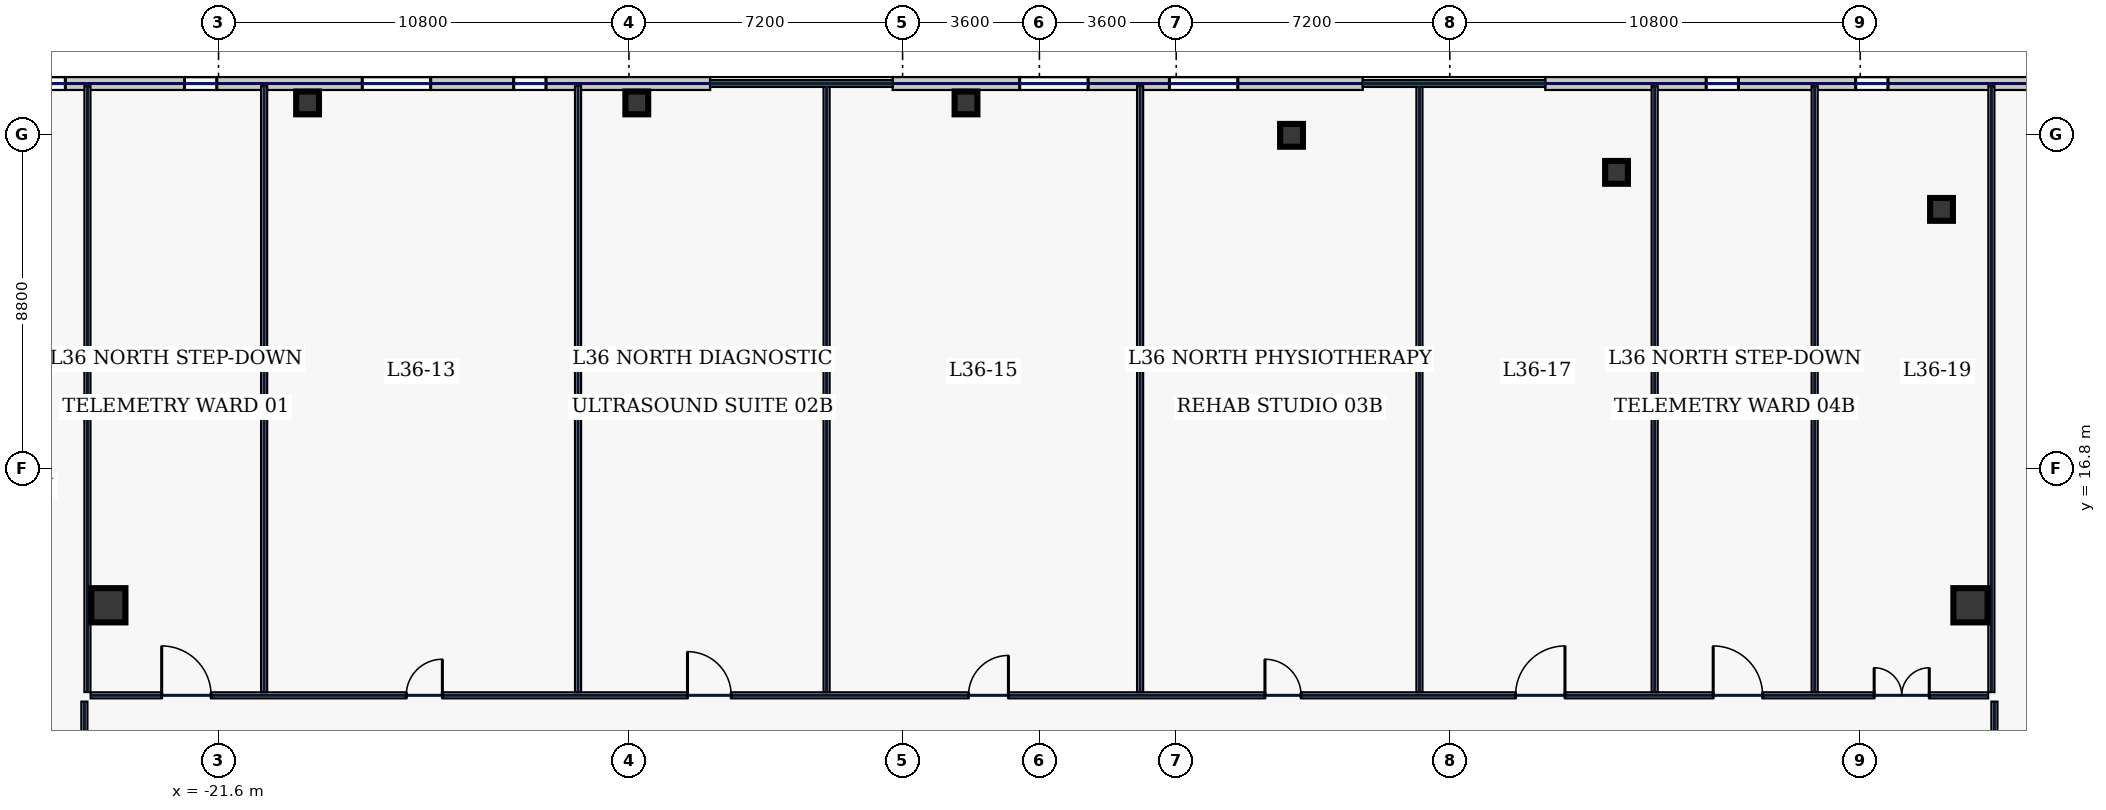
"""IFC4 building model, lengths in metres.
Left out: names, types, materials, properties, quantities, classifications, styles, units other than length and angle.
Written with IfcOpenShell. Run it as: python <this file> out.ifc"""

import sys

from ifc_helpers import new_model, si_unit, direction, frame, frame_2d, origin, origin_2d, place, context, subcontext, project, spatial, rectangle, hollow_rectangle, extrude, element, fill, save


model = new_model("IFC4")
c1 = context("Model", 3, precision=1e-05, world=origin(), true_north=direction((0.0, 1.0)))
c2 = subcontext(c1, "Body", "Model", "MODEL_VIEW")
j1 = project(units=[si_unit("LENGTHUNIT", "METRE"), si_unit("PLANEANGLEUNIT", "RADIAN")], contexts=[c1])
p1 = place(None, origin())
s1 = spatial("IfcSite", under=j1, at=p1, CompositionType="ELEMENT")
p2 = place(p1, origin())
s2 = spatial("IfcBuilding", under=s1, at=p2, CompositionType="ELEMENT")
p3 = place(p2, frame((0.0, 0.0, 160.2)))
s3 = spatial("IfcBuildingStorey", under=s2, at=p3, CompositionType="ELEMENT", Elevation=160.2)
for number, where, z_axis, x_axis in (
    (1, (-24.5, 13.2, 0.0), (0.0, 0.0, 1.0), (1.0, 0.0, 0.0)),
    (2, (24.5, 13.2, 0.0), (0.0, 0.0, 1.0), (1.0, 0.0, 0.0)),
):
    element("IfcColumn", number, at=place(p3, frame(where, z_axis=z_axis, x_axis=x_axis)), inside=s3, PredefinedType="COLUMN", context=c2, shape_type="SweptSolid", body=[
        extrude(hollow_rectangle(XDim=0.9, YDim=0.9, WallThickness=0.04, at=origin_2d()), origin(), (0.0, 0.0, 1.0), 3.74),
    ])
for number, where, z_axis, x_axis in (
    (3, (23.738, 23.618, 0.0), (0.0, 0.0, 1.0), (1.0, 0.0, 0.0)),
    (4, (15.186, 24.592, 0.0), (0.0, 0.0, 1.0), (1.0, 0.0, 0.0)),
    (5, (6.634, 25.567, 0.0), (0.0, 0.0, 1.0), (1.0, 0.0, 0.0)),
    (6, (-1.931, 26.42, 0.0), (0.0, 0.0, 1.0), (1.0, 0.0, 0.0)),
    (7, (-10.594, 26.42, 0.0), (0.0, 0.0, 1.0), (1.0, 0.0, 0.0)),
    (8, (-19.257, 26.42, 0.0), (0.0, 0.0, 1.0), (1.0, 0.0, 0.0)),
):
    element("IfcColumn", number, at=place(p3, frame(where, z_axis=z_axis, x_axis=x_axis)), inside=s3, PredefinedType="COLUMN", context=c2, shape_type="SweptSolid", body=[
        extrude(hollow_rectangle(XDim=0.6, YDim=0.6, WallThickness=0.028, at=origin_2d()), origin(), (0.0, 0.0, 1.0), 3.74),
    ])
p4 = place(p3, frame((33.4, 26.93, 0.0), z_axis=(0.0, 0.0, 1.0), x_axis=(-1.0, 0.0, 0.0)))
e9 = element("IfcWall", 9, at=p4, inside=s3, PredefinedType="STANDARD", context=c2, shape_type="SweptSolid", body=[
    extrude(rectangle(XDim=20.09, YDim=0.34, at=frame_2d((10.045, 0.0))), origin(), (0.0, 0.0, 1.0), 3.74),
])
p5 = place(p4, frame((15.005, 0.0, 0.7)))
e10 = element("IfcOpeningElement", 10, at=p5, cuts=e9, PredefinedType="OPENING", context=c2, shape_type="SweptSolid", body=[
    extrude(rectangle(XDim=0.85, YDim=1.85, at=frame_2d((0.425, 0.925))), frame((0.0, 0.18, 0.0), z_axis=(0.0, -1.0, 0.0), x_axis=(1.0, 0.0, 0.0)), (0.0, 0.0, 1.0), 0.36),
])
p6 = place(p4, frame((11.071, 0.0, 0.7)))
e11 = element("IfcOpeningElement", 11, at=p6, cuts=e9, PredefinedType="OPENING", context=c2, shape_type="SweptSolid", body=[
    extrude(rectangle(XDim=0.85, YDim=1.85, at=frame_2d((0.425, 0.925))), frame((0.0, 0.18, 0.0), z_axis=(0.0, -1.0, 0.0), x_axis=(1.0, 0.0, 0.0)), (0.0, 0.0, 1.0), 0.36),
])
p7 = place(p4, frame((6.48, 0.0, 0.7)))
e12 = element("IfcOpeningElement", 12, at=p7, cuts=e9, PredefinedType="OPENING", context=c2, shape_type="SweptSolid", body=[
    extrude(rectangle(XDim=0.85, YDim=1.85, at=frame_2d((0.425, 0.925))), frame((0.0, 0.18, 0.0), z_axis=(0.0, -1.0, 0.0), x_axis=(1.0, 0.0, 0.0)), (0.0, 0.0, 1.0), 0.36),
])
p8 = place(p4, frame((2.591, 0.0, 0.7)))
e13 = element("IfcOpeningElement", 13, at=p8, cuts=e9, PredefinedType="OPENING", context=c2, shape_type="SweptSolid", body=[
    extrude(rectangle(XDim=1.8, YDim=2.2, at=frame_2d((0.9, 1.1))), frame((0.0, 0.18, 0.0), z_axis=(0.0, -1.0, 0.0), x_axis=(1.0, 0.0, 0.0)), (0.0, 0.0, 1.0), 0.36),
])
p9 = place(p3, frame((8.51, 26.93, 0.0), z_axis=(0.0, 0.0, 1.0), x_axis=(-1.0, 0.0, 0.0)))
e14 = element("IfcWall", 14, at=p9, inside=s3, PredefinedType="STANDARD", context=c2, shape_type="SweptSolid", body=[
    extrude(rectangle(XDim=12.373, YDim=0.34, at=frame_2d((6.187, 0.0))), origin(), (0.0, 0.0, 1.0), 3.74),
])
p10 = place(p9, frame((7.229, 0.0, 0.7)))
e15 = element("IfcOpeningElement", 15, at=p10, cuts=e14, PredefinedType="OPENING", context=c2, shape_type="SweptSolid", body=[
    extrude(rectangle(XDim=1.8, YDim=2.2, at=frame_2d((0.9, 1.1))), frame((0.0, 0.18, 0.0), z_axis=(0.0, -1.0, 0.0), x_axis=(1.0, 0.0, 0.0)), (0.0, 0.0, 1.0), 0.36),
])
p11 = place(p9, frame((3.289, 0.0, 0.7)))
e16 = element("IfcOpeningElement", 16, at=p11, cuts=e14, PredefinedType="OPENING", context=c2, shape_type="SweptSolid", body=[
    extrude(rectangle(XDim=1.8, YDim=2.2, at=frame_2d((0.9, 1.1))), frame((0.0, 0.18, 0.0), z_axis=(0.0, -1.0, 0.0), x_axis=(1.0, 0.0, 0.0)), (0.0, 0.0, 1.0), 0.36),
])
p12 = place(p3, frame((-8.663, 26.93, 0.0), z_axis=(0.0, 0.0, 1.0), x_axis=(-1.0, 0.0, 0.0)))
e17 = element("IfcWall", 17, at=p12, inside=s3, PredefinedType="STANDARD", context=c2, shape_type="SweptSolid", body=[
    extrude(rectangle(XDim=19.937, YDim=0.34, at=frame_2d((9.969, 0.0))), origin(), (0.0, 0.0, 1.0), 3.74),
])
p13 = place(p12, frame((16.968, 0.0, 0.7)))
e18 = element("IfcOpeningElement", 18, at=p13, cuts=e17, PredefinedType="OPENING", context=c2, shape_type="SweptSolid", body=[
    extrude(rectangle(XDim=0.85, YDim=1.85, at=frame_2d((0.425, 0.925))), frame((0.0, 0.18, 0.0), z_axis=(0.0, -1.0, 0.0), x_axis=(1.0, 0.0, 0.0)), (0.0, 0.0, 1.0), 0.36),
])
p14 = place(p12, frame((12.983, 0.0, 0.7)))
e19 = element("IfcOpeningElement", 19, at=p14, cuts=e17, PredefinedType="OPENING", context=c2, shape_type="SweptSolid", body=[
    extrude(rectangle(XDim=0.85, YDim=1.85, at=frame_2d((0.425, 0.925))), frame((0.0, 0.18, 0.0), z_axis=(0.0, -1.0, 0.0), x_axis=(1.0, 0.0, 0.0)), (0.0, 0.0, 1.0), 0.36),
])
p15 = place(p12, frame((7.355, 0.0, 0.7)))
e20 = element("IfcOpeningElement", 20, at=p15, cuts=e17, PredefinedType="OPENING", context=c2, shape_type="SweptSolid", body=[
    extrude(rectangle(XDim=1.8, YDim=2.2, at=frame_2d((0.9, 1.1))), frame((0.0, 0.18, 0.0), z_axis=(0.0, -1.0, 0.0), x_axis=(1.0, 0.0, 0.0)), (0.0, 0.0, 1.0), 0.36),
])
p16 = place(p12, frame((4.321, 0.0, 0.7)))
e21 = element("IfcOpeningElement", 21, at=p16, cuts=e17, PredefinedType="OPENING", context=c2, shape_type="SweptSolid", body=[
    extrude(rectangle(XDim=0.85, YDim=1.85, at=frame_2d((0.425, 0.925))), frame((0.0, 0.18, 0.0), z_axis=(0.0, -1.0, 0.0), x_axis=(1.0, 0.0, 0.0)), (0.0, 0.0, 1.0), 0.36),
])
p17 = place(p3, frame((-25.13, 7.685, 0.0), z_axis=(0.0, 0.0, 1.0), x_axis=(0.0, 1.0, 0.0)))
e22 = element("IfcWall", 22, at=p17, inside=s3, PredefinedType="PARTITIONING", context=c2, shape_type="SweptSolid", body=[
    extrude(rectangle(XDim=2.98, YDim=0.16, at=frame_2d((1.49, 0.0))), origin(), (0.0, 0.0, 1.0), 3.74),
])
p18 = place(p17, frame((1.1, 0.0, 0.0)))
e23 = element("IfcOpeningElement", 23, at=p18, cuts=e22, PredefinedType="OPENING", context=c2, shape_type="SweptSolid", body=[
    extrude(rectangle(XDim=0.95, YDim=2.2, at=frame_2d((0.475, 1.1))), frame((0.0, 0.09, 0.0), z_axis=(0.0, -1.0, 0.0), x_axis=(1.0, 0.0, 0.0)), (0.0, 0.0, 1.0), 0.18),
])
p19 = place(p3, frame((-24.965, 10.83, 0.0), z_axis=(0.0, 0.0, 1.0), x_axis=(1.0, 0.0, 0.0)))
e24 = element("IfcWall", 24, at=p19, inside=s3, PredefinedType="PARTITIONING", context=c2, shape_type="SweptSolid", body=[
    extrude(rectangle(XDim=49.93, YDim=0.16, at=frame_2d((24.965, 0.0))), origin(), (0.0, 0.0, 1.0), 3.74),
])
p20 = place(p19, frame((1.869, 0.0, 0.0)))
e25 = element("IfcOpeningElement", 25, at=p20, cuts=e24, PredefinedType="OPENING", context=c2, shape_type="SweptSolid", body=[
    extrude(rectangle(XDim=1.3, YDim=2.2, at=frame_2d((0.65, 1.1))), frame((0.0, 0.09, 0.0), z_axis=(0.0, -1.0, 0.0), x_axis=(1.0, 0.0, 0.0)), (0.0, 0.0, 1.0), 0.18),
])
p21 = place(p19, frame((8.305, 0.0, 0.0)))
e26 = element("IfcOpeningElement", 26, at=p21, cuts=e24, PredefinedType="OPENING", context=c2, shape_type="SweptSolid", body=[
    extrude(rectangle(XDim=0.95, YDim=2.2, at=frame_2d((0.475, 1.1))), frame((0.0, 0.09, 0.0), z_axis=(0.0, -1.0, 0.0), x_axis=(1.0, 0.0, 0.0)), (0.0, 0.0, 1.0), 0.18),
])
p22 = place(p19, frame((15.705, 0.0, 0.0)))
e27 = element("IfcOpeningElement", 27, at=p22, cuts=e24, PredefinedType="OPENING", context=c2, shape_type="SweptSolid", body=[
    extrude(rectangle(XDim=1.15, YDim=2.2, at=frame_2d((0.575, 1.1))), frame((0.0, 0.09, 0.0), z_axis=(0.0, -1.0, 0.0), x_axis=(1.0, 0.0, 0.0)), (0.0, 0.0, 1.0), 0.18),
])
p23 = place(p19, frame((23.1, 0.0, 0.0)))
e28 = element("IfcOpeningElement", 28, at=p23, cuts=e24, PredefinedType="OPENING", context=c2, shape_type="SweptSolid", body=[
    extrude(rectangle(XDim=1.05, YDim=2.2, at=frame_2d((0.525, 1.1))), frame((0.0, 0.09, 0.0), z_axis=(0.0, -1.0, 0.0), x_axis=(1.0, 0.0, 0.0)), (0.0, 0.0, 1.0), 0.18),
])
p24 = place(p19, frame((30.9, 0.0, 0.0)))
e29 = element("IfcOpeningElement", 29, at=p24, cuts=e24, PredefinedType="OPENING", context=c2, shape_type="SweptSolid", body=[
    extrude(rectangle(XDim=0.95, YDim=2.2, at=frame_2d((0.475, 1.1))), frame((0.0, 0.09, 0.0), z_axis=(0.0, -1.0, 0.0), x_axis=(1.0, 0.0, 0.0)), (0.0, 0.0, 1.0), 0.18),
])
p25 = place(p19, frame((37.495, 0.0, 0.0)))
e30 = element("IfcOpeningElement", 30, at=p25, cuts=e24, PredefinedType="OPENING", context=c2, shape_type="SweptSolid", body=[
    extrude(rectangle(XDim=1.3, YDim=2.2, at=frame_2d((0.65, 1.1))), frame((0.0, 0.09, 0.0), z_axis=(0.0, -1.0, 0.0), x_axis=(1.0, 0.0, 0.0)), (0.0, 0.0, 1.0), 0.18),
])
p26 = place(p19, frame((42.695, 0.0, 0.0)))
e31 = element("IfcOpeningElement", 31, at=p26, cuts=e24, PredefinedType="OPENING", context=c2, shape_type="SweptSolid", body=[
    extrude(rectangle(XDim=1.3, YDim=2.2, at=frame_2d((0.65, 1.1))), frame((0.0, 0.09, 0.0), z_axis=(0.0, -1.0, 0.0), x_axis=(1.0, 0.0, 0.0)), (0.0, 0.0, 1.0), 0.18),
])
p27 = place(p19, frame((46.931, 0.0, 0.0)))
e32 = element("IfcOpeningElement", 32, at=p27, cuts=e24, PredefinedType="OPENING", context=c2, shape_type="SweptSolid", body=[
    extrude(rectangle(XDim=1.45, YDim=2.2, at=frame_2d((0.725, 1.1))), frame((0.0, 0.09, 0.0), z_axis=(0.0, -1.0, 0.0), x_axis=(1.0, 0.0, 0.0)), (0.0, 0.0, 1.0), 0.18),
])
p28 = place(p3, frame((25.13, 10.665, 0.0), z_axis=(0.0, 0.0, 1.0), x_axis=(0.0, -1.0, 0.0)))
e33 = element("IfcWall", 33, at=p28, inside=s3, PredefinedType="PARTITIONING", context=c2, shape_type="SweptSolid", body=[
    extrude(rectangle(XDim=2.98, YDim=0.16, at=frame_2d((1.49, 0.0))), origin(), (0.0, 0.0, 1.0), 3.74),
])
p29 = place(p28, frame((1.1, 0.0, 0.0)))
e34 = element("IfcOpeningElement", 34, at=p29, cuts=e33, PredefinedType="OPENING", context=c2, shape_type="SweptSolid", body=[
    extrude(rectangle(XDim=0.95, YDim=2.2, at=frame_2d((0.475, 1.1))), frame((0.0, 0.09, 0.0), z_axis=(0.0, -1.0, 0.0), x_axis=(1.0, 0.0, 0.0)), (0.0, 0.0, 1.0), 0.18),
])
p30 = place(p3, frame((-25.05, 10.915, 0.0), z_axis=(0.0, 0.0, 1.0), x_axis=(0.0, 1.0, 0.0)))
e35 = element("IfcWall", 35, at=p30, inside=s3, PredefinedType="PARTITIONING", context=c2, shape_type="SweptSolid", body=[
    extrude(rectangle(XDim=15.945, YDim=0.16, at=frame_2d((7.973, 0.0))), origin(), (0.0, 0.0, 1.0), 3.285),
])
for number, where, z_axis, x_axis in (
    (36, (25.05, 10.915, 0.0), (0.0, 0.0, 1.0), (0.0, 1.0, 0.0)),
    (37, (-20.4, 10.915, 0.0), (0.0, 0.0, 1.0), (0.0, 1.0, 0.0)),
    (38, (-5.6, 10.915, 0.0), (0.0, 0.0, 1.0), (0.0, 1.0, 0.0)),
    (39, (10.0, 10.915, 0.0), (0.0, 0.0, 1.0), (0.0, 1.0, 0.0)),
    (40, (20.4, 10.915, 0.0), (0.0, 0.0, 1.0), (0.0, 1.0, 0.0)),
    (41, (-12.14, 10.915, 0.0), (0.0, 0.0, 1.0), (0.0, 1.0, 0.0)),
    (42, (2.65, 10.915, 0.0), (0.0, 0.0, 1.0), (0.0, 1.0, 0.0)),
    (43, (16.19, 10.915, 0.0), (0.0, 0.0, 1.0), (0.0, 1.0, 0.0)),
):
    element("IfcWall", number, at=place(p3, frame(where, z_axis=z_axis, x_axis=x_axis)), inside=s3, PredefinedType="PARTITIONING", context=c2, shape_type="SweptSolid", body=[
        extrude(rectangle(XDim=15.945, YDim=0.16, at=frame_2d((7.973, 0.0))), origin(), (0.0, 0.0, 1.0), 3.74),
    ])
p31 = place(p5, origin())
e44 = element("IfcWindow", 44, at=p31, inside=s3, PartitioningType="SINGLE_PANEL", PredefinedType="WINDOW", context=c2, shape_type="SweptSolid", body=[
    extrude(rectangle(XDim=0.85, YDim=1.85, at=frame_2d((0.425, 0.925))), frame((0.0, 0.03, 0.0), z_axis=(0.0, -1.0, 0.0), x_axis=(1.0, 0.0, 0.0)), (0.0, 0.0, 1.0), 0.06),
])
fill(e10, e44)
p32 = place(p6, origin())
e45 = element("IfcWindow", 45, at=p32, inside=s3, PartitioningType="SINGLE_PANEL", PredefinedType="WINDOW", context=c2, shape_type="SweptSolid", body=[
    extrude(rectangle(XDim=0.85, YDim=1.85, at=frame_2d((0.425, 0.925))), frame((0.0, 0.03, 0.0), z_axis=(0.0, -1.0, 0.0), x_axis=(1.0, 0.0, 0.0)), (0.0, 0.0, 1.0), 0.06),
])
fill(e11, e45)
p33 = place(p10, origin())
e46 = element("IfcWindow", 46, at=p33, inside=s3, PartitioningType="SINGLE_PANEL", PredefinedType="WINDOW", context=c2, shape_type="SweptSolid", body=[
    extrude(rectangle(XDim=1.8, YDim=2.2, at=frame_2d((0.9, 1.1))), frame((0.0, 0.03, 0.0), z_axis=(0.0, -1.0, 0.0), x_axis=(1.0, 0.0, 0.0)), (0.0, 0.0, 1.0), 0.06),
])
fill(e15, e46)
p34 = place(p11, origin())
e47 = element("IfcWindow", 47, at=p34, inside=s3, PartitioningType="SINGLE_PANEL", PredefinedType="WINDOW", context=c2, shape_type="SweptSolid", body=[
    extrude(rectangle(XDim=1.8, YDim=2.2, at=frame_2d((0.9, 1.1))), frame((0.0, 0.03, 0.0), z_axis=(0.0, -1.0, 0.0), x_axis=(1.0, 0.0, 0.0)), (0.0, 0.0, 1.0), 0.06),
])
fill(e16, e47)
p35 = place(p13, origin())
e48 = element("IfcWindow", 48, at=p35, inside=s3, PartitioningType="SINGLE_PANEL", PredefinedType="WINDOW", context=c2, shape_type="SweptSolid", body=[
    extrude(rectangle(XDim=0.85, YDim=1.85, at=frame_2d((0.425, 0.925))), frame((0.0, 0.03, 0.0), z_axis=(0.0, -1.0, 0.0), x_axis=(1.0, 0.0, 0.0)), (0.0, 0.0, 1.0), 0.06),
])
fill(e18, e48)
p36 = place(p14, origin())
e49 = element("IfcWindow", 49, at=p36, inside=s3, PartitioningType="SINGLE_PANEL", PredefinedType="WINDOW", context=c2, shape_type="SweptSolid", body=[
    extrude(rectangle(XDim=0.85, YDim=1.85, at=frame_2d((0.425, 0.925))), frame((0.0, 0.03, 0.0), z_axis=(0.0, -1.0, 0.0), x_axis=(1.0, 0.0, 0.0)), (0.0, 0.0, 1.0), 0.06),
])
fill(e19, e49)
p37 = place(p15, origin())
e50 = element("IfcWindow", 50, at=p37, inside=s3, PartitioningType="SINGLE_PANEL", PredefinedType="WINDOW", context=c2, shape_type="SweptSolid", body=[
    extrude(rectangle(XDim=1.8, YDim=2.2, at=frame_2d((0.9, 1.1))), frame((0.0, 0.03, 0.0), z_axis=(0.0, -1.0, 0.0), x_axis=(1.0, 0.0, 0.0)), (0.0, 0.0, 1.0), 0.06),
])
fill(e20, e50)
p38 = place(p16, origin())
e51 = element("IfcWindow", 51, at=p38, inside=s3, PartitioningType="SINGLE_PANEL", PredefinedType="WINDOW", context=c2, shape_type="SweptSolid", body=[
    extrude(rectangle(XDim=0.85, YDim=1.85, at=frame_2d((0.425, 0.925))), frame((0.0, 0.03, 0.0), z_axis=(0.0, -1.0, 0.0), x_axis=(1.0, 0.0, 0.0)), (0.0, 0.0, 1.0), 0.06),
])
fill(e21, e51)
p39 = place(p20, origin())
e52 = element("IfcDoor", 52, at=p39, inside=s3, OperationType="SINGLE_SWING_LEFT", PredefinedType="DOOR", context=c2, shape_type="SweptSolid", body=[
    extrude(rectangle(XDim=1.3, YDim=2.2, at=frame_2d((0.65, 1.1))), frame((0.0, 0.025, 0.0), z_axis=(0.0, -1.0, 0.0), x_axis=(1.0, 0.0, 0.0)), (0.0, 0.0, 1.0), 0.05),
])
fill(e25, e52)
p40 = place(p21, origin())
e53 = element("IfcDoor", 53, at=p40, inside=s3, OperationType="SINGLE_SWING_RIGHT", PredefinedType="DOOR", context=c2, shape_type="SweptSolid", body=[
    extrude(rectangle(XDim=0.95, YDim=2.2, at=frame_2d((0.475, 1.1))), frame((0.0, 0.025, 0.0), z_axis=(0.0, -1.0, 0.0), x_axis=(1.0, 0.0, 0.0)), (0.0, 0.0, 1.0), 0.05),
])
fill(e26, e53)
p41 = place(p22, origin())
e54 = element("IfcDoor", 54, at=p41, inside=s3, OperationType="SINGLE_SWING_LEFT", PredefinedType="DOOR", context=c2, shape_type="SweptSolid", body=[
    extrude(rectangle(XDim=1.15, YDim=2.2, at=frame_2d((0.575, 1.1))), frame((0.0, 0.025, 0.0), z_axis=(0.0, -1.0, 0.0), x_axis=(1.0, 0.0, 0.0)), (0.0, 0.0, 1.0), 0.05),
])
fill(e27, e54)
p42 = place(p23, origin())
e55 = element("IfcDoor", 55, at=p42, inside=s3, OperationType="SINGLE_SWING_RIGHT", PredefinedType="DOOR", context=c2, shape_type="SweptSolid", body=[
    extrude(rectangle(XDim=1.05, YDim=2.2, at=frame_2d((0.525, 1.1))), frame((0.0, 0.025, 0.0), z_axis=(0.0, -1.0, 0.0), x_axis=(1.0, 0.0, 0.0)), (0.0, 0.0, 1.0), 0.05),
])
fill(e28, e55)
p43 = place(p24, origin())
e56 = element("IfcDoor", 56, at=p43, inside=s3, OperationType="SINGLE_SWING_LEFT", PredefinedType="DOOR", context=c2, shape_type="SweptSolid", body=[
    extrude(rectangle(XDim=0.95, YDim=2.2, at=frame_2d((0.475, 1.1))), frame((0.0, 0.025, 0.0), z_axis=(0.0, -1.0, 0.0), x_axis=(1.0, 0.0, 0.0)), (0.0, 0.0, 1.0), 0.05),
])
fill(e29, e56)
p44 = place(p25, origin())
e57 = element("IfcDoor", 57, at=p44, inside=s3, OperationType="SINGLE_SWING_RIGHT", PredefinedType="DOOR", context=c2, shape_type="SweptSolid", body=[
    extrude(rectangle(XDim=1.3, YDim=2.2, at=frame_2d((0.65, 1.1))), frame((0.0, 0.025, 0.0), z_axis=(0.0, -1.0, 0.0), x_axis=(1.0, 0.0, 0.0)), (0.0, 0.0, 1.0), 0.05),
])
fill(e30, e57)
p45 = place(p26, origin())
e58 = element("IfcDoor", 58, at=p45, inside=s3, OperationType="SINGLE_SWING_LEFT", PredefinedType="DOOR", context=c2, shape_type="SweptSolid", body=[
    extrude(rectangle(XDim=1.3, YDim=2.2, at=frame_2d((0.65, 1.1))), frame((0.0, 0.025, 0.0), z_axis=(0.0, -1.0, 0.0), x_axis=(1.0, 0.0, 0.0)), (0.0, 0.0, 1.0), 0.05),
])
fill(e31, e58)
p46 = place(p27, origin())
e59 = element("IfcDoor", 59, at=p46, inside=s3, OperationType="DOUBLE_SWING_LEFT", PredefinedType="DOOR", context=c2, shape_type="SweptSolid", body=[
    extrude(rectangle(XDim=1.45, YDim=2.2, at=frame_2d((0.725, 1.1))), frame((0.0, 0.025, 0.0), z_axis=(0.0, -1.0, 0.0), x_axis=(1.0, 0.0, 0.0)), (0.0, 0.0, 1.0), 0.05),
])
fill(e32, e59)
save(model, sys.argv[1])
